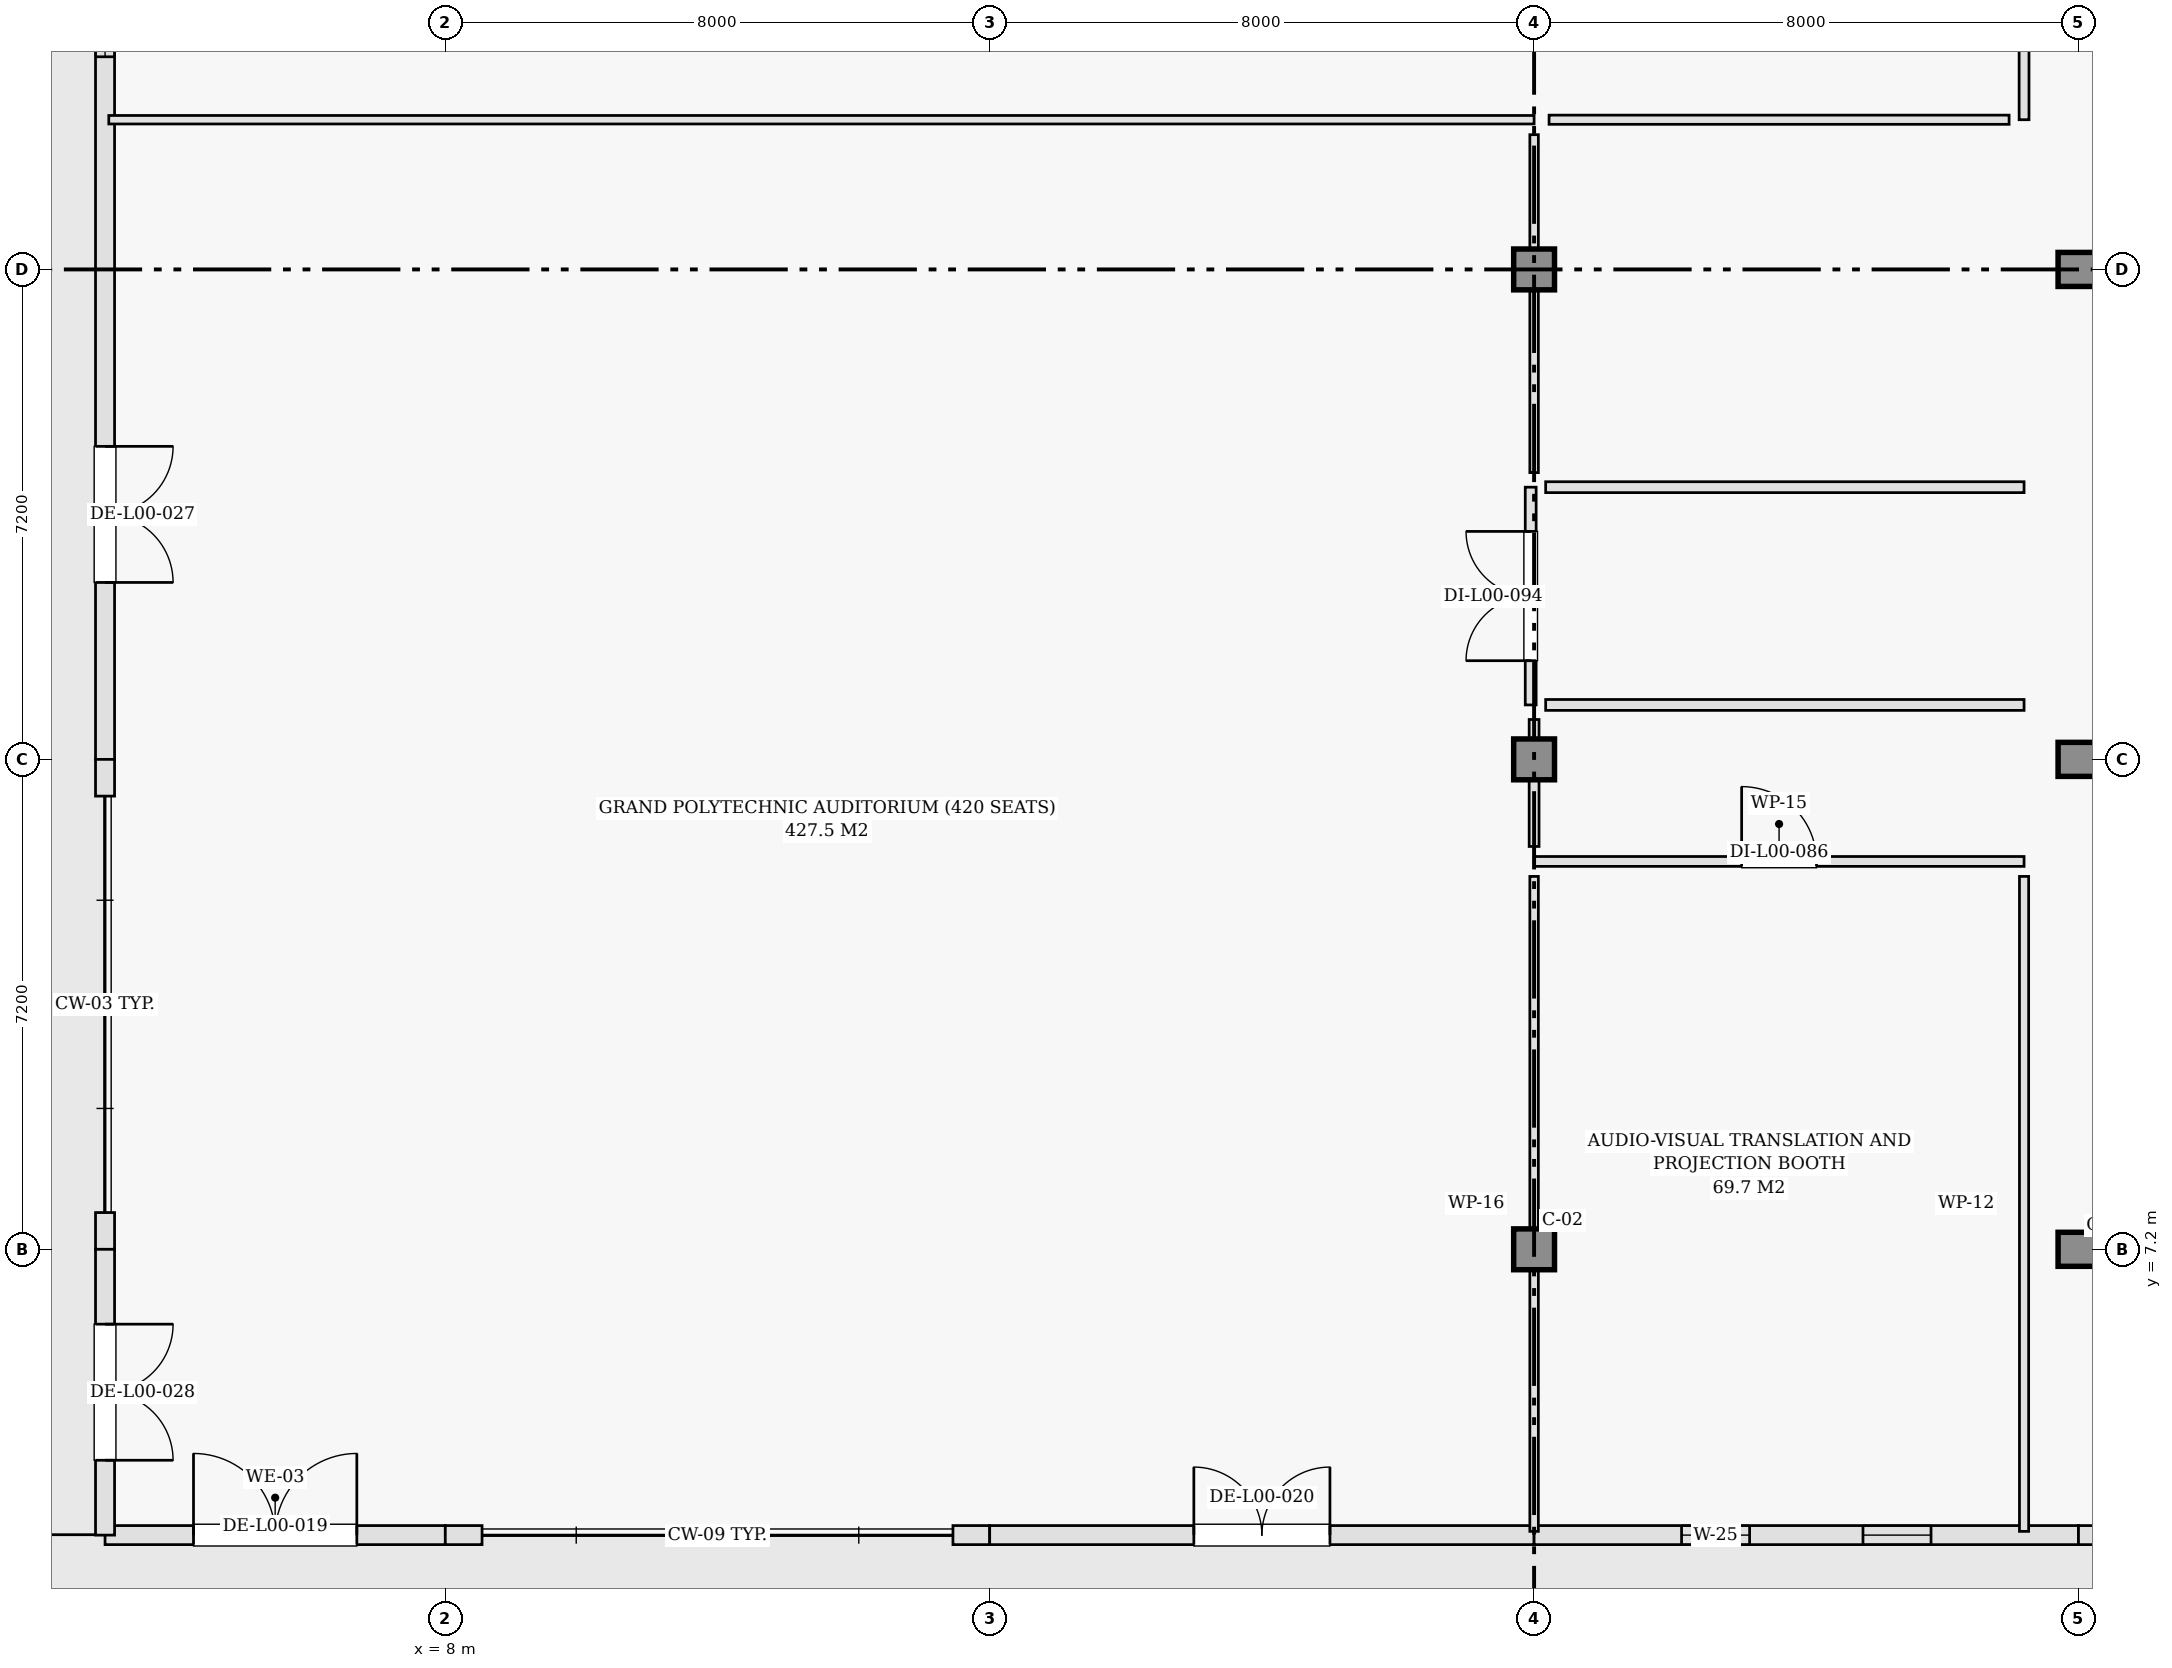
"""IFC4 building model, lengths in metres.
Left out: names, types, materials, properties, quantities, classifications, styles, units other than length and angle.
Written with IfcOpenShell. Run it as: python <this file> out.ifc"""

import sys

from ifc_helpers import new_model, si_unit, direction, frame, frame_2d, origin, origin_2d, place, context, subcontext, project, spatial, rectangle, extrude, element, fill, save


model = new_model("IFC4")
c1 = context("Model", 3, precision=1e-05, world=origin(), true_north=direction((0.0, 1.0)))
c2 = subcontext(c1, "Body", "Model", "MODEL_VIEW")
j1 = project(units=[si_unit("LENGTHUNIT", "METRE"), si_unit("PLANEANGLEUNIT", "RADIAN")], contexts=[c1])
p1 = place(None, origin())
s1 = spatial("IfcSite", under=j1, at=p1, CompositionType="ELEMENT")
p2 = place(p1, origin())
s2 = spatial("IfcBuilding", under=s1, at=p2, CompositionType="ELEMENT")
p3 = place(p2, origin())
s3 = spatial("IfcBuildingStorey", under=s2, at=p3, CompositionType="ELEMENT", Elevation=0.0)
for number, where, z_axis, x_axis in (
    (1, (24.0, 7.2, 0.0), (0.0, 0.0, 1.0), (1.0, 0.0, 0.0)),
    (2, (24.0, 14.4, 0.0), (0.0, 0.0, 1.0), (1.0, 0.0, 0.0)),
    (3, (24.0, 21.6, 0.0), (0.0, 0.0, 1.0), (1.0, 0.0, 0.0)),
):
    element("IfcColumn", number, at=place(p3, frame(where, z_axis=z_axis, x_axis=x_axis)), inside=s3, PredefinedType="COLUMN", context=c2, shape_type="SweptSolid", body=[
        extrude(rectangle(XDim=0.6, YDim=0.6, at=origin_2d()), origin(), (0.0, 0.0, 1.0), 4.8),
    ])
for number, where, z_axis, x_axis in (
    (4, (32.0, 7.2, 0.0), (0.0, 0.0, 1.0), (1.0, 0.0, 0.0)),
    (5, (32.0, 14.4, 0.0), (0.0, 0.0, 1.0), (1.0, 0.0, 0.0)),
    (6, (32.0, 21.6, 0.0), (0.0, 0.0, 1.0), (1.0, 0.0, 0.0)),
):
    element("IfcColumn", number, at=place(p3, frame(where, z_axis=z_axis, x_axis=x_axis)), inside=s3, PredefinedType="COLUMN", context=c2, shape_type="SweptSolid", body=[
        extrude(rectangle(XDim=0.5, YDim=0.5, at=origin_2d()), origin(), (0.0, 0.0, 1.0), 4.8),
    ])
p4 = place(p3, frame((3.0, 3.0, 0.0), z_axis=(0.0, 0.0, 1.0), x_axis=(1.0, 0.0, 0.0)))
e7 = element("IfcWall", 7, at=p4, inside=s3, PredefinedType="SOLIDWALL", context=c2, shape_type="SweptSolid", body=[
    extrude(rectangle(XDim=5.0, YDim=0.28, at=frame_2d((2.5, 0.0))), origin(), (0.0, 0.0, 1.0), 4.52),
])
p5 = place(p4, frame((1.3, 0.0, 0.0)))
e8 = element("IfcOpeningElement", 8, at=p5, cuts=e7, PredefinedType="OPENING", context=c2, shape_type="SweptSolid", body=[
    extrude(rectangle(XDim=2.4, YDim=2.4, at=frame_2d((1.2, 1.2))), frame((0.0, 0.15, 0.0), z_axis=(0.0, -1.0, 0.0), x_axis=(1.0, 0.0, 0.0)), (0.0, 0.0, 1.0), 0.3),
])
for number, where, z_axis, x_axis in (
    (9, (8.0, 3.0, 0.0), (0.0, 0.0, 1.0), (1.0, 0.0, 0.0)),
    (10, (15.46, 3.0, 0.0), (0.0, 0.0, 1.0), (1.0, 0.0, 0.0)),
):
    element("IfcWall", number, at=place(p3, frame(where, z_axis=z_axis, x_axis=x_axis)), inside=s3, PredefinedType="SOLIDWALL", context=c2, shape_type="SweptSolid", body=[
        extrude(rectangle(XDim=0.54, YDim=0.28, at=frame_2d((0.27, 0.0))), origin(), (0.0, 0.0, 1.0), 4.52),
    ])
p6 = place(p3, frame((16.0, 3.0, 0.0), z_axis=(0.0, 0.0, 1.0), x_axis=(1.0, 0.0, 0.0)))
e11 = element("IfcWall", 11, at=p6, inside=s3, PredefinedType="SOLIDWALL", context=c2, shape_type="SweptSolid", body=[
    extrude(rectangle(XDim=8.0, YDim=0.28, at=frame_2d((4.0, 0.0))), origin(), (0.0, 0.0, 1.0), 3.955),
])
p7 = place(p6, frame((3.0, 0.0, 0.0)))
e12 = element("IfcOpeningElement", 12, at=p7, cuts=e11, PredefinedType="OPENING", context=c2, shape_type="SweptSolid", body=[
    extrude(rectangle(XDim=2.0, YDim=2.3, at=frame_2d((1.0, 1.15))), frame((0.0, 0.15, 0.0), z_axis=(0.0, -1.0, 0.0), x_axis=(1.0, 0.0, 0.0)), (0.0, 0.0, 1.0), 0.3),
])
p8 = place(p3, frame((24.0, 3.0, 0.0), z_axis=(0.0, 0.0, 1.0), x_axis=(1.0, 0.0, 0.0)))
e13 = element("IfcWall", 13, at=p8, inside=s3, PredefinedType="SOLIDWALL", context=c2, shape_type="SweptSolid", body=[
    extrude(rectangle(XDim=8.0, YDim=0.28, at=frame_2d((4.0, 0.0))), origin(), (0.0, 0.0, 1.0), 3.955),
])
p9 = place(p8, frame((2.167, 0.0, 0.9)))
e14 = element("IfcOpeningElement", 14, at=p9, cuts=e13, PredefinedType="OPENING", context=c2, shape_type="SweptSolid", body=[
    extrude(rectangle(XDim=1.0, YDim=2.15, at=frame_2d((0.5, 1.075))), frame((0.0, 0.15, 0.0), z_axis=(0.0, -1.0, 0.0), x_axis=(1.0, 0.0, 0.0)), (0.0, 0.0, 1.0), 0.3),
])
p10 = place(p8, frame((4.833, 0.0, 0.9)))
e15 = element("IfcOpeningElement", 15, at=p10, cuts=e13, PredefinedType="OPENING", context=c2, shape_type="SweptSolid", body=[
    extrude(rectangle(XDim=1.0, YDim=2.15, at=frame_2d((0.5, 1.075))), frame((0.0, 0.15, 0.0), z_axis=(0.0, -1.0, 0.0), x_axis=(1.0, 0.0, 0.0)), (0.0, 0.0, 1.0), 0.3),
])
p11 = place(p3, frame((32.0, 3.0, 0.0), z_axis=(0.0, 0.0, 1.0), x_axis=(1.0, 0.0, 0.0)))
e16 = element("IfcWall", 16, at=p11, inside=s3, PredefinedType="SOLIDWALL", context=c2, shape_type="SweptSolid", body=[
    extrude(rectangle(XDim=8.0, YDim=0.28, at=frame_2d((4.0, 0.0))), origin(), (0.0, 0.0, 1.0), 3.955),
])
p12 = place(p11, frame((3.0, 0.0, 0.0)))
e17 = element("IfcOpeningElement", 17, at=p12, cuts=e16, PredefinedType="OPENING", context=c2, shape_type="SweptSolid", body=[
    extrude(rectangle(XDim=2.0, YDim=2.3, at=frame_2d((1.0, 1.15))), frame((0.0, 0.15, 0.0), z_axis=(0.0, -1.0, 0.0), x_axis=(1.0, 0.0, 0.0)), (0.0, 0.0, 1.0), 0.3),
])
p13 = place(p3, frame((3.0, 28.8, 0.0), z_axis=(0.0, 0.0, 1.0), x_axis=(0.0, -1.0, 0.0)))
e18 = element("IfcWall", 18, at=p13, inside=s3, PredefinedType="SOLIDWALL", context=c2, shape_type="SweptSolid", body=[
    extrude(rectangle(XDim=7.2, YDim=0.28, at=frame_2d((3.6, 0.0))), origin(), (0.0, 0.0, 1.0), 3.105),
])
p14 = place(p13, frame((3.125, 0.0, 1.885)))
e19 = element("IfcOpeningElement", 19, at=p14, cuts=e18, PredefinedType="OPENING", context=c2, shape_type="SweptSolid", body=[
    extrude(rectangle(XDim=0.95, YDim=1.0, at=frame_2d((0.475, 0.5))), frame((0.0, 0.15, 0.0), z_axis=(0.0, -1.0, 0.0), x_axis=(1.0, 0.0, 0.0)), (0.0, 0.0, 1.0), 0.3),
])
p15 = place(p3, frame((3.0, 21.6, 0.0), z_axis=(0.0, 0.0, 1.0), x_axis=(0.0, -1.0, 0.0)))
e20 = element("IfcWall", 20, at=p15, inside=s3, PredefinedType="SOLIDWALL", context=c2, shape_type="SweptSolid", body=[
    extrude(rectangle(XDim=7.2, YDim=0.28, at=frame_2d((3.6, 0.0))), origin(), (0.0, 0.0, 1.0), 3.105),
])
p16 = place(p15, frame((2.6, 0.0, 0.0)))
e21 = element("IfcOpeningElement", 21, at=p16, cuts=e20, PredefinedType="OPENING", context=c2, shape_type="SweptSolid", body=[
    extrude(rectangle(XDim=2.0, YDim=2.3, at=frame_2d((1.0, 1.15))), frame((0.0, 0.15, 0.0), z_axis=(0.0, -1.0, 0.0), x_axis=(1.0, 0.0, 0.0)), (0.0, 0.0, 1.0), 0.3),
])
p17 = place(p3, frame((3.0, 14.4, 0.0), z_axis=(0.0, 0.0, 1.0), x_axis=(0.0, -1.0, 0.0)))
e22 = element("IfcWall", 22, at=p17, inside=s3, PredefinedType="SOLIDWALL", context=c2, shape_type="SweptSolid", body=[
    extrude(rectangle(XDim=0.54, YDim=0.28, at=frame_2d((0.27, 0.0))), origin(), (0.0, 0.0, 1.0), 3.105),
])
p18 = place(p3, frame((3.0, 7.74, 0.0), z_axis=(0.0, 0.0, 1.0), x_axis=(0.0, -1.0, 0.0)))
e23 = element("IfcWall", 23, at=p18, inside=s3, PredefinedType="SOLIDWALL", context=c2, shape_type="SweptSolid", body=[
    extrude(rectangle(XDim=0.54, YDim=0.28, at=frame_2d((0.27, 0.0))), origin(), (0.0, 0.0, 1.0), 3.105),
])
p19 = place(p3, frame((3.0, 7.2, 0.0), z_axis=(0.0, 0.0, 1.0), x_axis=(0.0, -1.0, 0.0)))
e24 = element("IfcWall", 24, at=p19, inside=s3, PredefinedType="SOLIDWALL", context=c2, shape_type="SweptSolid", body=[
    extrude(rectangle(XDim=4.2, YDim=0.28, at=frame_2d((2.1, 0.0))), origin(), (0.0, 0.0, 1.0), 3.105),
])
p20 = place(p19, frame((1.1, 0.0, 0.0)))
e25 = element("IfcOpeningElement", 25, at=p20, cuts=e24, PredefinedType="OPENING", context=c2, shape_type="SweptSolid", body=[
    extrude(rectangle(XDim=2.0, YDim=2.3, at=frame_2d((1.0, 1.15))), frame((0.0, 0.15, 0.0), z_axis=(0.0, -1.0, 0.0), x_axis=(1.0, 0.0, 0.0)), (0.0, 0.0, 1.0), 0.3),
])
p21 = place(p3, frame((24.0, 12.9, 0.0), z_axis=(0.0, 0.0, 1.0), x_axis=(1.0, 0.0, 0.0)))
e26 = element("IfcWall", 26, at=p21, inside=s3, PredefinedType="PARTITIONING", context=c2, shape_type="SweptSolid", body=[
    extrude(rectangle(XDim=7.2, YDim=0.145, at=frame_2d((3.6, 0.0))), origin(), (0.0, 0.0, 1.0), 3.955),
])
p22 = place(p21, frame((3.05, 0.0, 0.0)))
e27 = element("IfcOpeningElement", 27, at=p22, cuts=e26, PredefinedType="OPENING", context=c2, shape_type="SweptSolid", body=[
    extrude(rectangle(XDim=1.1, YDim=2.15, at=frame_2d((0.55, 1.075))), frame((0.0, 0.083, 0.0), z_axis=(0.0, -1.0, 0.0), x_axis=(1.0, 0.0, 0.0)), (0.0, 0.0, 1.0), 0.165),
])
p23 = place(p3, frame((31.2, 3.055, 0.0), z_axis=(0.0, 0.0, 1.0), x_axis=(0.0, 1.0, 0.0)))
e28 = element("IfcWall", 28, at=p23, inside=s3, PredefinedType="PARTITIONING", context=c2, shape_type="SweptSolid", body=[
    extrude(rectangle(XDim=9.625, YDim=0.135, at=frame_2d((4.812, 0.0))), origin(), (0.0, 0.0, 1.0), 3.905),
])
p24 = place(p3, frame((24.0, 3.055, 0.0), z_axis=(0.0, 0.0, 1.0), x_axis=(0.0, 1.0, 0.0)))
e29 = element("IfcWall", 29, at=p24, inside=s3, PredefinedType="PARTITIONING", context=c2, shape_type="SweptSolid", body=[
    extrude(rectangle(XDim=9.625, YDim=0.125, at=frame_2d((4.812, 0.0))), origin(), (0.0, 0.0, 1.0), 3.955),
])
p25 = place(p3, frame((23.95, 15.2, 0.0), z_axis=(0.0, 0.0, 1.0), x_axis=(0.0, 1.0, 0.0)))
e30 = element("IfcWall", 30, at=p25, inside=s3, PredefinedType="PARTITIONING", context=c2, shape_type="SweptSolid", body=[
    extrude(rectangle(XDim=3.2, YDim=0.16, at=frame_2d((1.6, 0.0))), origin(), (0.0, 0.0, 1.0), 3.955),
])
p26 = place(p25, frame((0.65, 0.0, 0.0)))
e31 = element("IfcOpeningElement", 31, at=p26, cuts=e30, PredefinedType="OPENING", context=c2, shape_type="SweptSolid", body=[
    extrude(rectangle(XDim=1.9, YDim=2.25, at=frame_2d((0.95, 1.125))), frame((0.0, 0.09, 0.0), z_axis=(0.0, -1.0, 0.0), x_axis=(1.0, 0.0, 0.0)), (0.0, 0.0, 1.0), 0.18),
])
p27 = place(p3, frame((3.055, 23.8, 0.0), z_axis=(0.0, 0.0, 1.0), x_axis=(1.0, 0.0, 0.0)))
e32 = element("IfcWall", 32, at=p27, inside=s3, PredefinedType="PARTITIONING", context=c2, shape_type="SweptSolid", body=[
    extrude(rectangle(XDim=20.945, YDim=0.125, at=frame_2d((10.473, 0.0))), origin(), (0.0, 0.0, 1.0), 3.955),
])
p28 = place(p3, frame((31.2, 23.8, 0.0), z_axis=(0.0, 0.0, 1.0), x_axis=(0.0, 1.0, 0.0)))
e33 = element("IfcWall", 33, at=p28, inside=s3, PredefinedType="PARTITIONING", context=c2, shape_type="SweptSolid", body=[
    extrude(rectangle(XDim=11.895, YDim=0.145, at=frame_2d((5.948, 0.0))), origin(), (0.0, 0.0, 1.0), 3.905),
])
p29 = place(p28, frame((6.335, 0.0, 0.0)))
e34 = element("IfcOpeningElement", 34, at=p29, cuts=e33, PredefinedType="OPENING", context=c2, shape_type="SweptSolid", body=[
    extrude(rectangle(XDim=1.9, YDim=2.25, at=frame_2d((0.95, 1.125))), frame((0.0, 0.083, 0.0), z_axis=(0.0, -1.0, 0.0), x_axis=(1.0, 0.0, 0.0)), (0.0, 0.0, 1.0), 0.165),
])
p30 = place(p3, frame((24.22, 23.8, 0.0), z_axis=(0.0, 0.0, 1.0), x_axis=(1.0, 0.0, 0.0)))
e35 = element("IfcWall", 35, at=p30, inside=s3, PredefinedType="PARTITIONING", context=c2, shape_type="SweptSolid", body=[
    extrude(rectangle(XDim=6.76, YDim=0.135, at=frame_2d((3.38, 0.0))), origin(), (0.0, 0.0, 1.0), 4.52),
])
p31 = place(p3, frame((24.0, 18.614, 0.0), z_axis=(0.0, 0.0, 1.0), x_axis=(0.0, 1.0, 0.0)))
e36 = element("IfcWall", 36, at=p31, inside=s3, PredefinedType="PARTITIONING", context=c2, shape_type="SweptSolid", body=[
    extrude(rectangle(XDim=4.966, YDim=0.125, at=frame_2d((2.483, 0.0))), origin(), (0.0, 0.0, 1.0), 3.955),
])
p32 = place(p3, frame((24.0, 13.12, 0.0), z_axis=(0.0, 0.0, 1.0), x_axis=(0.0, 1.0, 0.0)))
e37 = element("IfcWall", 37, at=p32, inside=s3, PredefinedType="PARTITIONING", context=c2, shape_type="SweptSolid", body=[
    extrude(rectangle(XDim=1.866, YDim=0.145, at=frame_2d((0.933, 0.0))), origin(), (0.0, 0.0, 1.0), 3.955),
])
for number, where, z_axis, x_axis in (
    (38, (24.17, 15.2, 0.0), (0.0, 0.0, 1.0), (1.0, 0.0, 0.0)),
    (39, (24.17, 18.4, 0.0), (0.0, 0.0, 1.0), (1.0, 0.0, 0.0)),
):
    element("IfcWall", number, at=place(p3, frame(where, z_axis=z_axis, x_axis=x_axis)), inside=s3, PredefinedType="PARTITIONING", context=c2, shape_type="SweptSolid", body=[
        extrude(rectangle(XDim=7.03, YDim=0.16, at=frame_2d((3.515, 0.0))), origin(), (0.0, 0.0, 1.0), 4.52),
    ])
p33 = place(p5, origin())
e40 = element("IfcDoor", 40, at=p33, inside=s3, OperationType="DOUBLE_DOOR_SINGLE_SWING", PredefinedType="DOOR", context=c2, shape_type="SweptSolid", body=[
    extrude(rectangle(XDim=2.4, YDim=2.4, at=frame_2d((1.2, 1.2))), frame((0.0, 0.025, 0.0), z_axis=(0.0, -1.0, 0.0), x_axis=(1.0, 0.0, 0.0)), (0.0, 0.0, 1.0), 0.05),
])
fill(e8, e40)
p34 = place(p7, origin())
e41 = element("IfcDoor", 41, at=p34, inside=s3, OperationType="DOUBLE_DOOR_SINGLE_SWING", PredefinedType="DOOR", context=c2, shape_type="SweptSolid", body=[
    extrude(rectangle(XDim=2.0, YDim=2.3, at=frame_2d((1.0, 1.15))), frame((0.0, 0.025, 0.0), z_axis=(0.0, -1.0, 0.0), x_axis=(1.0, 0.0, 0.0)), (0.0, 0.0, 1.0), 0.05),
])
fill(e12, e41)
p35 = place(p9, origin())
e42 = element("IfcWindow", 42, at=p35, inside=s3, PartitioningType="DOUBLE_PANEL_VERTICAL", PredefinedType="WINDOW", context=c2, shape_type="SweptSolid", body=[
    extrude(rectangle(XDim=1.0, YDim=2.15, at=frame_2d((0.5, 1.075))), frame((0.0, 0.03, 0.0), z_axis=(0.0, -1.0, 0.0), x_axis=(1.0, 0.0, 0.0)), (0.0, 0.0, 1.0), 0.06),
])
fill(e14, e42)
p36 = place(p10, origin())
e43 = element("IfcWindow", 43, at=p36, inside=s3, PartitioningType="DOUBLE_PANEL_VERTICAL", PredefinedType="WINDOW", context=c2, shape_type="SweptSolid", body=[
    extrude(rectangle(XDim=1.0, YDim=2.15, at=frame_2d((0.5, 1.075))), frame((0.0, 0.03, 0.0), z_axis=(0.0, -1.0, 0.0), x_axis=(1.0, 0.0, 0.0)), (0.0, 0.0, 1.0), 0.06),
])
fill(e15, e43)
p37 = place(p14, origin())
e44 = element("IfcWindow", 44, at=p37, inside=s3, PartitioningType="DOUBLE_PANEL_VERTICAL", PredefinedType="WINDOW", context=c2, shape_type="SweptSolid", body=[
    extrude(rectangle(XDim=0.95, YDim=1.0, at=frame_2d((0.475, 0.5))), frame((0.0, 0.03, 0.0), z_axis=(0.0, -1.0, 0.0), x_axis=(1.0, 0.0, 0.0)), (0.0, 0.0, 1.0), 0.06),
])
fill(e19, e44)
p38 = place(p16, origin())
e45 = element("IfcDoor", 45, at=p38, inside=s3, OperationType="DOUBLE_DOOR_SINGLE_SWING", PredefinedType="DOOR", context=c2, shape_type="SweptSolid", body=[
    extrude(rectangle(XDim=2.0, YDim=2.3, at=frame_2d((1.0, 1.15))), frame((0.0, 0.025, 0.0), z_axis=(0.0, -1.0, 0.0), x_axis=(1.0, 0.0, 0.0)), (0.0, 0.0, 1.0), 0.05),
])
fill(e21, e45)
p39 = place(p20, origin())
e46 = element("IfcDoor", 46, at=p39, inside=s3, OperationType="DOUBLE_DOOR_SINGLE_SWING", PredefinedType="DOOR", context=c2, shape_type="SweptSolid", body=[
    extrude(rectangle(XDim=2.0, YDim=2.3, at=frame_2d((1.0, 1.15))), frame((0.0, 0.025, 0.0), z_axis=(0.0, -1.0, 0.0), x_axis=(1.0, 0.0, 0.0)), (0.0, 0.0, 1.0), 0.05),
])
fill(e25, e46)
p40 = place(p22, origin())
e47 = element("IfcDoor", 47, at=p40, inside=s3, OperationType="SINGLE_SWING_LEFT", PredefinedType="DOOR", context=c2, shape_type="SweptSolid", body=[
    extrude(rectangle(XDim=1.1, YDim=2.15, at=frame_2d((0.55, 1.075))), frame((0.0, 0.025, 0.0), z_axis=(0.0, -1.0, 0.0), x_axis=(1.0, 0.0, 0.0)), (0.0, 0.0, 1.0), 0.05),
])
fill(e27, e47)
p41 = place(p26, origin())
e48 = element("IfcDoor", 48, at=p41, inside=s3, OperationType="DOUBLE_DOOR_SINGLE_SWING", PredefinedType="DOOR", context=c2, shape_type="SweptSolid", body=[
    extrude(rectangle(XDim=1.9, YDim=2.25, at=frame_2d((0.95, 1.125))), frame((0.0, 0.025, 0.0), z_axis=(0.0, -1.0, 0.0), x_axis=(1.0, 0.0, 0.0)), (0.0, 0.0, 1.0), 0.05),
])
fill(e31, e48)
save(model, sys.argv[1])
